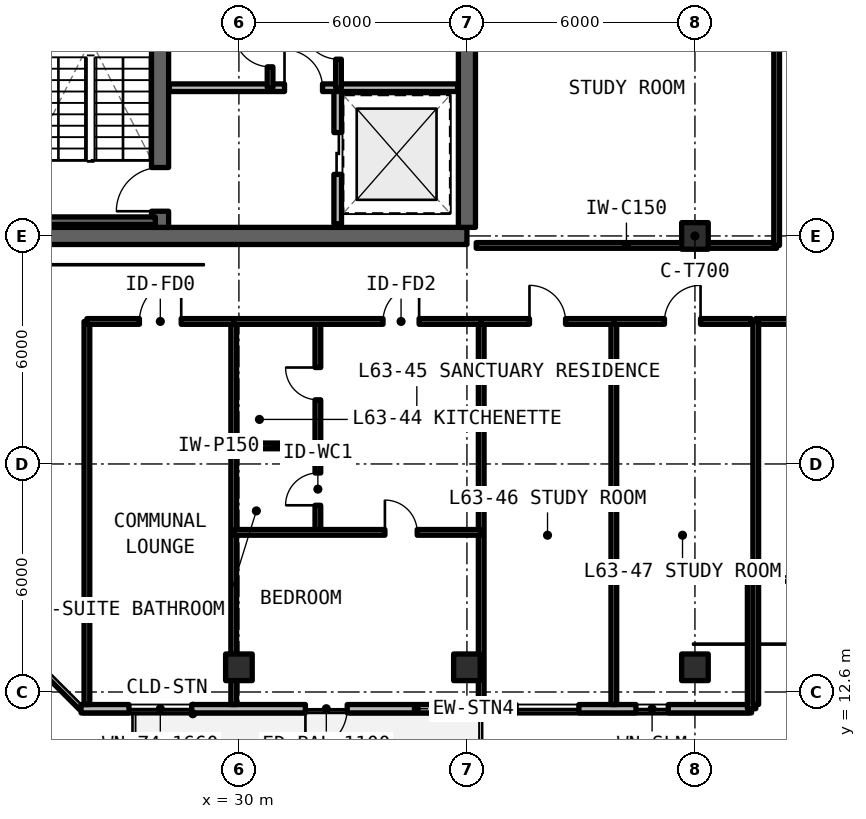
"""IFC4 building model, lengths in metres.
Left out: names, types, materials, properties, quantities, classifications, styles, units other than length and angle.
Written with IfcOpenShell. Run it as: python <this file> out.ifc"""

import sys

from ifc_helpers import new_model, si_unit, direction, frame, frame_2d, origin, origin_2d, place, context, subcontext, project, spatial, rectangle, extrude, element, fill, save


model = new_model("IFC4")
c1 = context("Model", 3, precision=1e-05, world=origin(), true_north=direction((0.0, 1.0)))
c2 = subcontext(c1, "Body", "Model", "MODEL_VIEW")
j1 = project(units=[si_unit("LENGTHUNIT", "METRE"), si_unit("PLANEANGLEUNIT", "RADIAN")], contexts=[c1])
p1 = place(None, origin())
s1 = spatial("IfcSite", under=j1, at=p1, CompositionType="ELEMENT")
p2 = place(p1, origin())
s2 = spatial("IfcBuilding", under=s1, at=p2, CompositionType="ELEMENT")
p3 = place(p2, frame((0.0, 0.0, 226.05)))
s3 = spatial("IfcBuildingStorey", under=s2, at=p3, CompositionType="ELEMENT", Elevation=226.05)
p4 = place(p3, frame((24.0, 24.6, 0.0), z_axis=(0.0, 0.0, 1.0), x_axis=(1.0, 0.0, 0.0)))
e1 = element("IfcWall", 1, at=p4, inside=s3, PredefinedType="SHEAR", context=c2, shape_type="SweptSolid", body=[
    extrude(rectangle(XDim=12.0, YDim=0.45, at=frame_2d((6.0, 0.0))), origin(), (0.0, 0.0, 1.0), 3.3),
])
p5 = place(p3, frame((36.0, 24.825, 0.0), z_axis=(0.0, 0.0, 1.0), x_axis=(0.0, 1.0, 0.0)))
e2 = element("IfcWall", 2, at=p5, inside=s3, PredefinedType="SHEAR", context=c2, shape_type="SweptSolid", body=[
    extrude(rectangle(XDim=8.975, YDim=0.45, at=frame_2d((4.488, 0.0))), origin(), (0.0, 0.0, 1.0), 3.3),
])
p6 = place(p3, frame((27.925, 24.825, 0.0), z_axis=(0.0, 0.0, 1.0), x_axis=(0.0, 1.0, 0.0)))
e3 = element("IfcWall", 3, at=p6, inside=s3, PredefinedType="SHEAR", context=c2, shape_type="SweptSolid", body=[
    extrude(rectangle(XDim=17.55, YDim=0.45, at=frame_2d((8.775, 0.0))), origin(), (0.0, 0.0, 1.0), 3.3),
])
p7 = place(p6, frame((0.425, 0.0, 0.0)))
e4 = element("IfcOpeningElement", 4, at=p7, cuts=e3, PredefinedType="OPENING", context=c2, shape_type="SweptSolid", body=[
    extrude(rectangle(XDim=1.15, YDim=2.15, at=frame_2d((0.575, 1.075))), frame((0.0, 0.235, 0.0), z_axis=(0.0, -1.0, 0.0), x_axis=(1.0, 0.0, 0.0)), (0.0, 0.0, 1.0), 0.47),
])
p8 = place(p6, frame((9.625, 0.0, 0.0)))
e5 = element("IfcOpeningElement", 5, at=p8, cuts=e3, PredefinedType="OPENING", context=c2, shape_type="SweptSolid", body=[
    extrude(rectangle(XDim=1.15, YDim=2.15, at=frame_2d((0.575, 1.075))), frame((0.0, 0.235, 0.0), z_axis=(0.0, -1.0, 0.0), x_axis=(1.0, 0.0, 0.0)), (0.0, 0.0, 1.0), 0.47),
])
for number, where, z_axis, x_axis in (
    (6, (42.0, 24.6, 0.0), (0.0, 0.0, 1.0), (1.0, 0.0, 0.0)),
    (7, (30.0, 13.25, 0.0), (0.0, 0.0, 1.0), (1.0, 0.0, 0.0)),
    (8, (36.0, 13.25, 0.0), (0.0, 0.0, 1.0), (1.0, 0.0, 0.0)),
    (9, (42.0, 13.25, 0.0), (0.0, 0.0, 1.0), (1.0, 0.0, 0.0)),
):
    element("IfcColumn", number, at=place(p3, frame(where, z_axis=z_axis, x_axis=x_axis)), inside=s3, PredefinedType="COLUMN", context=c2, shape_type="SweptSolid", body=[
        extrude(rectangle(XDim=0.7, YDim=0.7, at=origin_2d()), origin(), (0.0, 0.0, 1.0), 3.02),
    ])
p9 = place(p3, frame((25.846, 12.16, 0.0), z_axis=(0.0, 0.0, 1.0), x_axis=(1.0, 0.0, 0.0)))
e10 = element("IfcWall", 10, at=p9, inside=s3, PredefinedType="SOLIDWALL", context=c2, shape_type="SweptSolid", body=[
    extrude(rectangle(XDim=17.644, YDim=0.22, at=frame_2d((8.822, 0.0))), origin(), (0.0, 0.0, 1.0), 3.02),
])
p10 = place(p9, frame((5.904, 0.0, 0.0)))
e11 = element("IfcOpeningElement", 11, at=p10, cuts=e10, PredefinedType="OPENING", context=c2, shape_type="SweptSolid", body=[
    extrude(rectangle(XDim=1.1, YDim=2.15, at=frame_2d((0.55, 1.075))), frame((0.0, 0.12, 0.0), z_axis=(0.0, -1.0, 0.0), x_axis=(1.0, 0.0, 0.0)), (0.0, 0.0, 1.0), 0.24),
])
p11 = place(p9, frame((1.261, 0.0, 0.78)))
e12 = element("IfcOpeningElement", 12, at=p11, cuts=e10, PredefinedType="OPENING", context=c2, shape_type="SweptSolid", body=[
    extrude(rectangle(XDim=1.65, YDim=1.66, at=frame_2d((0.825, 0.83))), frame((0.0, 0.12, 0.0), z_axis=(0.0, -1.0, 0.0), x_axis=(1.0, 0.0, 0.0)), (0.0, 0.0, 1.0), 0.24),
])
p12 = place(p9, frame((11.45, 0.0, 0.78)))
e13 = element("IfcOpeningElement", 13, at=p12, cuts=e10, PredefinedType="OPENING", context=c2, shape_type="SweptSolid", body=[
    extrude(rectangle(XDim=1.65, YDim=1.66, at=frame_2d((0.825, 0.83))), frame((0.0, 0.12, 0.0), z_axis=(0.0, -1.0, 0.0), x_axis=(1.0, 0.0, 0.0)), (0.0, 0.0, 1.0), 0.24),
])
p13 = place(p9, frame((14.602, 0.0, 0.78)))
e14 = element("IfcOpeningElement", 14, at=p13, cuts=e10, PredefinedType="OPENING", context=c2, shape_type="SweptSolid", body=[
    extrude(rectangle(XDim=0.85, YDim=1.65, at=frame_2d((0.425, 0.825))), frame((0.0, 0.12, 0.0), z_axis=(0.0, -1.0, 0.0), x_axis=(1.0, 0.0, 0.0)), (0.0, 0.0, 1.0), 0.24),
])
p14 = place(p3, frame((43.49, 12.16, 0.0), z_axis=(0.0, 0.0, 1.0), x_axis=(0.0, 1.0, 0.0)))
e15 = element("IfcWall", 15, at=p14, inside=s3, PredefinedType="SOLIDWALL", context=c2, shape_type="SweptSolid", body=[
    extrude(rectangle(XDim=3.4, YDim=0.22, at=frame_2d((1.7, 0.0))), origin(), (0.0, 0.0, 1.0), 3.02),
])
p15 = place(p3, frame((32.6, 24.92, 0.0), z_axis=(0.0, 0.0, 1.0), x_axis=(0.0, 1.0, 0.0)))
e16 = element("IfcWall", 16, at=p15, inside=s3, PredefinedType="SOLIDWALL", context=c2, shape_type="SweptSolid", body=[
    extrude(rectangle(XDim=3.58, YDim=0.2, at=frame_2d((1.79, 0.0))), origin(), (0.0, 0.0, 1.0), 2.35),
])
p16 = place(p15, frame((1.3, 0.0, 0.0)))
e17 = element("IfcOpeningElement", 17, at=p16, cuts=e16, PredefinedType="OPENING", context=c2, shape_type="SweptSolid", body=[
    extrude(rectangle(XDim=1.1, YDim=2.2, at=frame_2d((0.55, 1.1))), frame((0.0, 0.11, 0.0), z_axis=(0.0, -1.0, 0.0), x_axis=(1.0, 0.0, 0.0)), (0.0, 0.0, 1.0), 0.22),
])
p17 = place(p3, frame((28.17, 28.5, 0.0), z_axis=(0.0, 0.0, 1.0), x_axis=(1.0, 0.0, 0.0)))
e18 = element("IfcWall", 18, at=p17, inside=s3, PredefinedType="SOLIDWALL", context=c2, shape_type="SweptSolid", body=[
    extrude(rectangle(XDim=7.585, YDim=0.2, at=frame_2d((3.792, 0.0))), origin(), (0.0, 0.0, 1.0), 2.35),
])
p18 = place(p17, frame((3.03, 0.0, 0.0)))
e19 = element("IfcOpeningElement", 19, at=p18, cuts=e18, PredefinedType="OPENING", context=c2, shape_type="SweptSolid", body=[
    extrude(rectangle(XDim=1.0, YDim=2.15, at=frame_2d((0.5, 1.075))), frame((0.0, 0.11, 0.0), z_axis=(0.0, -1.0, 0.0), x_axis=(1.0, 0.0, 0.0)), (0.0, 0.0, 1.0), 0.22),
])
p19 = place(p3, frame((30.82, 28.5, 0.0), z_axis=(0.0, 0.0, 1.0), x_axis=(0.0, 1.0, 0.0)))
e20 = element("IfcWall", 20, at=p19, inside=s3, PredefinedType="SOLIDWALL", context=c2, shape_type="SweptSolid", body=[
    extrude(rectangle(XDim=5.22, YDim=0.15, at=frame_2d((2.61, 0.0))), origin(), (0.0, 0.0, 1.0), 2.35),
])
p20 = place(p19, frame((0.55, 0.0, 0.0)))
e21 = element("IfcOpeningElement", 21, at=p20, cuts=e20, PredefinedType="OPENING", context=c2, shape_type="SweptSolid", body=[
    extrude(rectangle(XDim=0.95, YDim=2.15, at=frame_2d((0.475, 1.075))), frame((0.0, 0.085, 0.0), z_axis=(0.0, -1.0, 0.0), x_axis=(1.0, 0.0, 0.0)), (0.0, 0.0, 1.0), 0.17),
])
p21 = place(p19, frame((3.35, 0.0, 0.0)))
e22 = element("IfcOpeningElement", 22, at=p21, cuts=e20, PredefinedType="OPENING", context=c2, shape_type="SweptSolid", body=[
    extrude(rectangle(XDim=0.95, YDim=2.15, at=frame_2d((0.475, 1.075))), frame((0.0, 0.085, 0.0), z_axis=(0.0, -1.0, 0.0), x_axis=(1.0, 0.0, 0.0)), (0.0, 0.0, 1.0), 0.17),
])
p22 = place(p3, frame((32.62, 28.5, 0.0), z_axis=(0.0, 0.0, 1.0), x_axis=(0.0, 1.0, 0.0)))
e23 = element("IfcWall", 23, at=p22, inside=s3, PredefinedType="SOLIDWALL", context=c2, shape_type="SweptSolid", body=[
    extrude(rectangle(XDim=5.22, YDim=0.15, at=frame_2d((2.61, 0.0))), origin(), (0.0, 0.0, 1.0), 2.35),
])
p23 = place(p22, frame((0.75, 0.0, 0.0)))
e24 = element("IfcOpeningElement", 24, at=p23, cuts=e23, PredefinedType="OPENING", context=c2, shape_type="SweptSolid", body=[
    extrude(rectangle(XDim=0.95, YDim=2.15, at=frame_2d((0.475, 1.075))), frame((0.0, 0.085, 0.0), z_axis=(0.0, -1.0, 0.0), x_axis=(1.0, 0.0, 0.0)), (0.0, 0.0, 1.0), 0.17),
])
p24 = place(p22, frame((3.35, 0.0, 0.0)))
e25 = element("IfcOpeningElement", 25, at=p24, cuts=e23, PredefinedType="OPENING", context=c2, shape_type="SweptSolid", body=[
    extrude(rectangle(XDim=0.95, YDim=2.15, at=frame_2d((0.475, 1.075))), frame((0.0, 0.085, 0.0), z_axis=(0.0, -1.0, 0.0), x_axis=(1.0, 0.0, 0.0)), (0.0, 0.0, 1.0), 0.17),
])
p25 = place(p3, frame((36.245, 24.35, 0.0), z_axis=(0.0, 0.0, 1.0), x_axis=(1.0, 0.0, 0.0)))
e26 = element("IfcWall", 26, at=p25, inside=s3, PredefinedType="SOLIDWALL", context=c2, shape_type="SweptSolid", body=[
    extrude(rectangle(XDim=7.905, YDim=0.15, at=frame_2d((3.952, 0.0))), origin(), (0.0, 0.0, 1.0), 2.35),
])
p26 = place(p3, frame((44.15, 24.35, 0.0), z_axis=(0.0, 0.0, 1.0), x_axis=(0.0, 1.0, 0.0)))
e27 = element("IfcWall", 27, at=p26, inside=s3, PredefinedType="SOLIDWALL", context=c2, shape_type="SweptSolid", body=[
    extrude(rectangle(XDim=9.4, YDim=0.15, at=frame_2d((4.7, 0.0))), origin(), (0.0, 0.0, 1.0), 2.35),
])
p27 = place(p3, frame((43.6, 22.35, 0.0), z_axis=(0.0, 0.0, 1.0), x_axis=(1.0, 0.0, 0.0)))
e28 = element("IfcWall", 28, at=p27, inside=s3, PredefinedType="SOLIDWALL", context=c2, shape_type="SweptSolid", body=[
    extrude(rectangle(XDim=8.4, YDim=0.15, at=frame_2d((4.2, 0.0))), origin(), (0.0, 0.0, 1.0), 2.35),
])
p28 = place(p27, frame((3.65, 0.0, 0.0)))
e29 = element("IfcOpeningElement", 29, at=p28, cuts=e28, PredefinedType="OPENING", context=c2, shape_type="SweptSolid", body=[
    extrude(rectangle(XDim=1.1, YDim=2.15, at=frame_2d((0.55, 1.075))), frame((0.0, 0.085, 0.0), z_axis=(0.0, -1.0, 0.0), x_axis=(1.0, 0.0, 0.0)), (0.0, 0.0, 1.0), 0.17),
])
for number, where, z_axis, x_axis in (
    (30, (43.6, 12.27, 0.0), (0.0, 0.0, 1.0), (0.0, 1.0, 0.0)),
    (31, (26.0, 12.27, 0.0), (0.0, 0.0, 1.0), (0.0, 1.0, 0.0)),
    (32, (29.864, 12.27, 0.0), (0.0, 0.0, 1.0), (0.0, 1.0, 0.0)),
):
    element("IfcWall", number, at=place(p3, frame(where, z_axis=z_axis, x_axis=x_axis)), inside=s3, PredefinedType="SOLIDWALL", context=c2, shape_type="SweptSolid", body=[
        extrude(rectangle(XDim=10.08, YDim=0.15, at=frame_2d((5.04, 0.0))), origin(), (0.0, 0.0, 1.0), 2.35),
    ])
p29 = place(p3, frame((26.0, 22.35, 0.0), z_axis=(0.0, 0.0, 1.0), x_axis=(1.0, 0.0, 0.0)))
e33 = element("IfcWall", 33, at=p29, inside=s3, PredefinedType="SOLIDWALL", context=c2, shape_type="SweptSolid", body=[
    extrude(rectangle(XDim=3.864, YDim=0.15, at=frame_2d((1.932, 0.0))), origin(), (0.0, 0.0, 1.0), 2.35),
])
p30 = place(p29, frame((1.382, 0.0, 0.0)))
e34 = element("IfcOpeningElement", 34, at=p30, cuts=e33, PredefinedType="OPENING", context=c2, shape_type="SweptSolid", body=[
    extrude(rectangle(XDim=1.1, YDim=2.15, at=frame_2d((0.55, 1.075))), frame((0.0, 0.085, 0.0), z_axis=(0.0, -1.0, 0.0), x_axis=(1.0, 0.0, 0.0)), (0.0, 0.0, 1.0), 0.17),
])
p31 = place(p3, frame((36.376, 12.27, 0.0), z_axis=(0.0, 0.0, 1.0), x_axis=(0.0, 1.0, 0.0)))
e35 = element("IfcWall", 35, at=p31, inside=s3, PredefinedType="SOLIDWALL", context=c2, shape_type="SweptSolid", body=[
    extrude(rectangle(XDim=10.08, YDim=0.15, at=frame_2d((5.04, 0.0))), origin(), (0.0, 0.0, 1.0), 2.35),
])
p32 = place(p3, frame((29.864, 19.075, 0.0), z_axis=(0.0, 0.0, 1.0), x_axis=(1.0, 0.0, 0.0)))
e36 = element("IfcWall", 36, at=p32, inside=s3, PredefinedType="PARTITIONING", context=c2, shape_type="SweptSolid", body=[
    extrude(rectangle(XDim=2.214, YDim=0.15, at=frame_2d((1.107, 0.0))), origin(), (0.0, 0.0, 1.0), 2.35),
])
p33 = place(p3, frame((32.078, 16.8, 0.0), z_axis=(0.0, 0.0, 1.0), x_axis=(0.0, 1.0, 0.0)))
e37 = element("IfcWall", 37, at=p33, inside=s3, PredefinedType="PARTITIONING", context=c2, shape_type="SweptSolid", body=[
    extrude(rectangle(XDim=5.55, YDim=0.15, at=frame_2d((2.775, 0.0))), origin(), (0.0, 0.0, 1.0), 2.35),
])
p34 = place(p33, frame((0.713, 0.0, 0.0)))
e38 = element("IfcOpeningElement", 38, at=p34, cuts=e37, PredefinedType="OPENING", context=c2, shape_type="SweptSolid", body=[
    extrude(rectangle(XDim=0.85, YDim=2.1, at=frame_2d((0.425, 1.05))), frame((0.0, 0.085, 0.0), z_axis=(0.0, -1.0, 0.0), x_axis=(1.0, 0.0, 0.0)), (0.0, 0.0, 1.0), 0.17),
])
p35 = place(p33, frame((3.488, 0.0, 0.0)))
e39 = element("IfcOpeningElement", 39, at=p35, cuts=e37, PredefinedType="OPENING", context=c2, shape_type="SweptSolid", body=[
    extrude(rectangle(XDim=0.85, YDim=2.1, at=frame_2d((0.425, 1.05))), frame((0.0, 0.085, 0.0), z_axis=(0.0, -1.0, 0.0), x_axis=(1.0, 0.0, 0.0)), (0.0, 0.0, 1.0), 0.17),
])
p36 = place(p3, frame((29.864, 16.8, 0.0), z_axis=(0.0, 0.0, 1.0), x_axis=(1.0, 0.0, 0.0)))
e40 = element("IfcWall", 40, at=p36, inside=s3, PredefinedType="PARTITIONING", context=c2, shape_type="SweptSolid", body=[
    extrude(rectangle(XDim=6.512, YDim=0.15, at=frame_2d((3.256, 0.0))), origin(), (0.0, 0.0, 1.0), 2.35),
])
p37 = place(p36, frame((3.978, 0.0, 0.0)))
e41 = element("IfcOpeningElement", 41, at=p37, cuts=e40, PredefinedType="OPENING", context=c2, shape_type="SweptSolid", body=[
    extrude(rectangle(XDim=0.85, YDim=2.1, at=frame_2d((0.425, 1.05))), frame((0.0, 0.085, 0.0), z_axis=(0.0, -1.0, 0.0), x_axis=(1.0, 0.0, 0.0)), (0.0, 0.0, 1.0), 0.17),
])
p38 = place(p3, frame((29.864, 22.35, 0.0), z_axis=(0.0, 0.0, 1.0), x_axis=(1.0, 0.0, 0.0)))
e42 = element("IfcWall", 42, at=p38, inside=s3, PredefinedType="SOLIDWALL", context=c2, shape_type="SweptSolid", body=[
    extrude(rectangle(XDim=6.512, YDim=0.15, at=frame_2d((3.256, 0.0))), origin(), (0.0, 0.0, 1.0), 2.35),
])
p39 = place(p38, frame((3.928, 0.0, 0.0)))
e43 = element("IfcOpeningElement", 43, at=p39, cuts=e42, PredefinedType="OPENING", context=c2, shape_type="SweptSolid", body=[
    extrude(rectangle(XDim=0.95, YDim=2.15, at=frame_2d((0.475, 1.075))), frame((0.0, 0.085, 0.0), z_axis=(0.0, -1.0, 0.0), x_axis=(1.0, 0.0, 0.0)), (0.0, 0.0, 1.0), 0.17),
])
p40 = place(p3, frame((39.866, 12.27, 0.0), z_axis=(0.0, 0.0, 1.0), x_axis=(0.0, 1.0, 0.0)))
e44 = element("IfcWall", 44, at=p40, inside=s3, PredefinedType="SOLIDWALL", context=c2, shape_type="SweptSolid", body=[
    extrude(rectangle(XDim=10.08, YDim=0.15, at=frame_2d((5.04, 0.0))), origin(), (0.0, 0.0, 1.0), 2.35),
])
p41 = place(p3, frame((36.376, 22.35, 0.0), z_axis=(0.0, 0.0, 1.0), x_axis=(1.0, 0.0, 0.0)))
e45 = element("IfcWall", 45, at=p41, inside=s3, PredefinedType="SOLIDWALL", context=c2, shape_type="SweptSolid", body=[
    extrude(rectangle(XDim=3.49, YDim=0.15, at=frame_2d((1.745, 0.0))), origin(), (0.0, 0.0, 1.0), 2.35),
])
p42 = place(p41, frame((1.27, 0.0, 0.0)))
e46 = element("IfcOpeningElement", 46, at=p42, cuts=e45, PredefinedType="OPENING", context=c2, shape_type="SweptSolid", body=[
    extrude(rectangle(XDim=0.95, YDim=2.15, at=frame_2d((0.475, 1.075))), frame((0.0, 0.085, 0.0), z_axis=(0.0, -1.0, 0.0), x_axis=(1.0, 0.0, 0.0)), (0.0, 0.0, 1.0), 0.17),
])
p43 = place(p3, frame((39.866, 22.35, 0.0), z_axis=(0.0, 0.0, 1.0), x_axis=(1.0, 0.0, 0.0)))
e47 = element("IfcWall", 47, at=p43, inside=s3, PredefinedType="SOLIDWALL", context=c2, shape_type="SweptSolid", body=[
    extrude(rectangle(XDim=3.614, YDim=0.15, at=frame_2d((1.807, 0.0))), origin(), (0.0, 0.0, 1.0), 2.35),
])
p44 = place(p43, frame((1.332, 0.0, 0.0)))
e48 = element("IfcOpeningElement", 48, at=p44, cuts=e47, PredefinedType="OPENING", context=c2, shape_type="SweptSolid", body=[
    extrude(rectangle(XDim=0.95, YDim=2.15, at=frame_2d((0.475, 1.075))), frame((0.0, 0.085, 0.0), z_axis=(0.0, -1.0, 0.0), x_axis=(1.0, 0.0, 0.0)), (0.0, 0.0, 1.0), 0.17),
])
p45 = place(p3, frame((24.4, 25.0, 0.0), z_axis=(0.0, 0.0, 1.0), x_axis=(1.0, 0.0, 0.0)))
e49 = element("IfcWall", 49, at=p45, inside=s3, PredefinedType="SOLIDWALL", context=c2, shape_type="SweptSolid", body=[
    extrude(rectangle(XDim=3.4, YDim=0.2, at=frame_2d((1.7, 0.0))), origin(), (0.0, 0.0, 1.0), 3.3),
])
p46 = place(p10, frame((1.1, 0.0, 0.0), z_axis=(0.0, 0.0, 1.0), x_axis=(-1.0, 0.0, 0.0)))
e50 = element("IfcDoor", 50, at=p46, inside=s3, OperationType="SINGLE_SWING_LEFT", PredefinedType="DOOR", context=c2, shape_type="SweptSolid", body=[
    extrude(rectangle(XDim=1.1, YDim=2.15, at=frame_2d((0.55, 1.075))), frame((0.0, 0.025, 0.0), z_axis=(0.0, -1.0, 0.0), x_axis=(1.0, 0.0, 0.0)), (0.0, 0.0, 1.0), 0.05),
])
fill(e11, e50)
p47 = place(p11, origin())
e51 = element("IfcWindow", 51, at=p47, inside=s3, PartitioningType="SINGLE_PANEL", PredefinedType="WINDOW", context=c2, shape_type="SweptSolid", body=[
    extrude(rectangle(XDim=1.65, YDim=1.66, at=frame_2d((0.825, 0.83))), frame((0.0, 0.03, 0.0), z_axis=(0.0, -1.0, 0.0), x_axis=(1.0, 0.0, 0.0)), (0.0, 0.0, 1.0), 0.06),
])
fill(e12, e51)
p48 = place(p12, origin())
e52 = element("IfcWindow", 52, at=p48, inside=s3, PartitioningType="SINGLE_PANEL", PredefinedType="WINDOW", context=c2, shape_type="SweptSolid", body=[
    extrude(rectangle(XDim=1.65, YDim=1.66, at=frame_2d((0.825, 0.83))), frame((0.0, 0.03, 0.0), z_axis=(0.0, -1.0, 0.0), x_axis=(1.0, 0.0, 0.0)), (0.0, 0.0, 1.0), 0.06),
])
fill(e13, e52)
p49 = place(p13, origin())
e53 = element("IfcWindow", 53, at=p49, inside=s3, PartitioningType="SINGLE_PANEL", PredefinedType="WINDOW", context=c2, shape_type="SweptSolid", body=[
    extrude(rectangle(XDim=0.85, YDim=1.65, at=frame_2d((0.425, 0.825))), frame((0.0, 0.03, 0.0), z_axis=(0.0, -1.0, 0.0), x_axis=(1.0, 0.0, 0.0)), (0.0, 0.0, 1.0), 0.06),
])
fill(e14, e53)
p50 = place(p16, origin())
e54 = element("IfcDoor", 54, at=p50, inside=s3, OperationType="SLIDING_TO_LEFT", PredefinedType="DOOR", context=c2, shape_type="SweptSolid", body=[
    extrude(rectangle(XDim=1.1, YDim=2.2, at=frame_2d((0.55, 1.1))), frame((0.0, 0.025, 0.0), z_axis=(0.0, -1.0, 0.0), x_axis=(1.0, 0.0, 0.0)), (0.0, 0.0, 1.0), 0.05),
])
fill(e17, e54)
p51 = place(p18, origin())
e55 = element("IfcDoor", 55, at=p51, inside=s3, OperationType="SINGLE_SWING_LEFT", PredefinedType="DOOR", context=c2, shape_type="SweptSolid", body=[
    extrude(rectangle(XDim=1.0, YDim=2.15, at=frame_2d((0.5, 1.075))), frame((0.0, 0.025, 0.0), z_axis=(0.0, -1.0, 0.0), x_axis=(1.0, 0.0, 0.0)), (0.0, 0.0, 1.0), 0.05),
])
fill(e19, e55)
p52 = place(p20, origin())
e56 = element("IfcDoor", 56, at=p52, inside=s3, OperationType="SINGLE_SWING_RIGHT", PredefinedType="DOOR", context=c2, shape_type="SweptSolid", body=[
    extrude(rectangle(XDim=0.95, YDim=2.15, at=frame_2d((0.475, 1.075))), frame((0.0, 0.025, 0.0), z_axis=(0.0, -1.0, 0.0), x_axis=(1.0, 0.0, 0.0)), (0.0, 0.0, 1.0), 0.05),
])
fill(e21, e56)
p53 = place(p23, origin())
e57 = element("IfcDoor", 57, at=p53, inside=s3, OperationType="SINGLE_SWING_RIGHT", PredefinedType="DOOR", context=c2, shape_type="SweptSolid", body=[
    extrude(rectangle(XDim=0.95, YDim=2.15, at=frame_2d((0.475, 1.075))), frame((0.0, 0.025, 0.0), z_axis=(0.0, -1.0, 0.0), x_axis=(1.0, 0.0, 0.0)), (0.0, 0.0, 1.0), 0.05),
])
fill(e24, e57)
p54 = place(p30, origin())
e58 = element("IfcDoor", 58, at=p54, inside=s3, OperationType="SINGLE_SWING_RIGHT", PredefinedType="DOOR", context=c2, shape_type="SweptSolid", body=[
    extrude(rectangle(XDim=1.1, YDim=2.15, at=frame_2d((0.55, 1.075))), frame((0.0, 0.025, 0.0), z_axis=(0.0, -1.0, 0.0), x_axis=(1.0, 0.0, 0.0)), (0.0, 0.0, 1.0), 0.05),
])
fill(e34, e58)
p55 = place(p34, origin())
e59 = element("IfcDoor", 59, at=p55, inside=s3, OperationType="SINGLE_SWING_LEFT", PredefinedType="DOOR", context=c2, shape_type="SweptSolid", body=[
    extrude(rectangle(XDim=0.85, YDim=2.1, at=frame_2d((0.425, 1.05))), frame((0.0, 0.025, 0.0), z_axis=(0.0, -1.0, 0.0), x_axis=(1.0, 0.0, 0.0)), (0.0, 0.0, 1.0), 0.05),
])
fill(e38, e59)
p56 = place(p35, origin())
e60 = element("IfcDoor", 60, at=p56, inside=s3, OperationType="SINGLE_SWING_RIGHT", PredefinedType="DOOR", context=c2, shape_type="SweptSolid", body=[
    extrude(rectangle(XDim=0.85, YDim=2.1, at=frame_2d((0.425, 1.05))), frame((0.0, 0.025, 0.0), z_axis=(0.0, -1.0, 0.0), x_axis=(1.0, 0.0, 0.0)), (0.0, 0.0, 1.0), 0.05),
])
fill(e39, e60)
p57 = place(p37, origin())
e61 = element("IfcDoor", 61, at=p57, inside=s3, OperationType="SINGLE_SWING_LEFT", PredefinedType="DOOR", context=c2, shape_type="SweptSolid", body=[
    extrude(rectangle(XDim=0.85, YDim=2.1, at=frame_2d((0.425, 1.05))), frame((0.0, 0.025, 0.0), z_axis=(0.0, -1.0, 0.0), x_axis=(1.0, 0.0, 0.0)), (0.0, 0.0, 1.0), 0.05),
])
fill(e41, e61)
p58 = place(p39, origin())
e62 = element("IfcDoor", 62, at=p58, inside=s3, OperationType="SINGLE_SWING_RIGHT", PredefinedType="DOOR", context=c2, shape_type="SweptSolid", body=[
    extrude(rectangle(XDim=0.95, YDim=2.15, at=frame_2d((0.475, 1.075))), frame((0.0, 0.025, 0.0), z_axis=(0.0, -1.0, 0.0), x_axis=(1.0, 0.0, 0.0)), (0.0, 0.0, 1.0), 0.05),
])
fill(e43, e62)
p59 = place(p42, origin())
e63 = element("IfcDoor", 63, at=p59, inside=s3, OperationType="SINGLE_SWING_LEFT", PredefinedType="DOOR", context=c2, shape_type="SweptSolid", body=[
    extrude(rectangle(XDim=0.95, YDim=2.15, at=frame_2d((0.475, 1.075))), frame((0.0, 0.025, 0.0), z_axis=(0.0, -1.0, 0.0), x_axis=(1.0, 0.0, 0.0)), (0.0, 0.0, 1.0), 0.05),
])
fill(e46, e63)
p60 = place(p44, origin())
e64 = element("IfcDoor", 64, at=p60, inside=s3, OperationType="SINGLE_SWING_RIGHT", PredefinedType="DOOR", context=c2, shape_type="SweptSolid", body=[
    extrude(rectangle(XDim=0.95, YDim=2.15, at=frame_2d((0.475, 1.075))), frame((0.0, 0.025, 0.0), z_axis=(0.0, -1.0, 0.0), x_axis=(1.0, 0.0, 0.0)), (0.0, 0.0, 1.0), 0.05),
])
fill(e48, e64)
p61 = place(p7, origin())
e65 = element("IfcDoor", 65, at=p61, inside=s3, OperationType="SINGLE_SWING_RIGHT", PredefinedType="DOOR", context=c2, shape_type="SweptSolid", body=[
    extrude(rectangle(XDim=1.15, YDim=2.15, at=frame_2d((0.575, 1.075))), frame((0.0, 0.025, 0.0), z_axis=(0.0, -1.0, 0.0), x_axis=(1.0, 0.0, 0.0)), (0.0, 0.0, 1.0), 0.05),
])
fill(e4, e65)
save(model, sys.argv[1])
